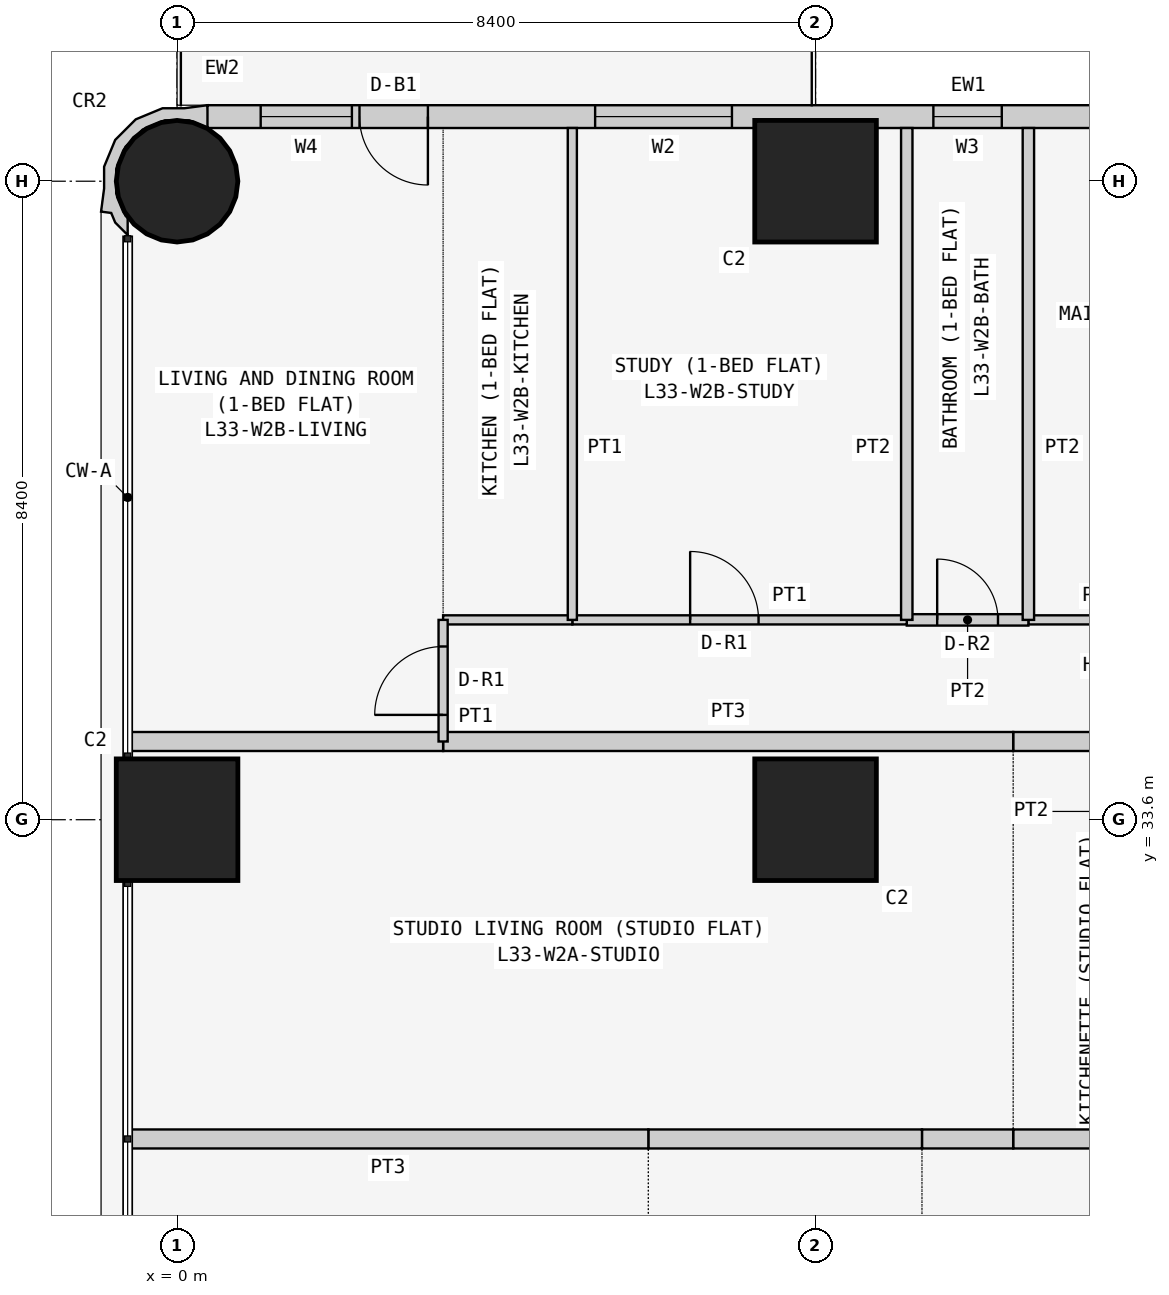
"""IFC4 building model, lengths in metres.
Left out: names, types, materials, properties, quantities, classifications, styles, units other than length and angle.
Written with IfcOpenShell. Run it as: python <this file> out.ifc"""

import sys

from ifc_helpers import new_model, si_unit, direction, frame, frame_2d, origin, origin_2d, place, context, subcontext, project, spatial, polyline, rectangle, circle, outline, extrude, element, fill, save


model = new_model("IFC4")
c1 = context("Model", 3, precision=1e-05, world=origin(), true_north=direction((0.0, 1.0)))
c2 = subcontext(c1, "Body", "Model", "MODEL_VIEW")
j1 = project(units=[si_unit("LENGTHUNIT", "METRE"), si_unit("PLANEANGLEUNIT", "RADIAN")], contexts=[c1])
p1 = place(None, origin())
s1 = spatial("IfcSite", under=j1, at=p1, CompositionType="ELEMENT")
p2 = place(p1, origin())
s2 = spatial("IfcBuilding", under=s1, at=p2, CompositionType="ELEMENT")
p3 = place(p2, frame((0.0, 0.0, 130.5)))
s3 = spatial("IfcBuildingStorey", under=s2, at=p3, CompositionType="ELEMENT", Elevation=130.5)
p4 = place(p3, frame((0.0, 33.6, 0.0), z_axis=(0.0, 0.0, 1.0), x_axis=(1.0, 0.0, 0.0)))
e1 = element("IfcColumn", 1, at=p4, inside=s3, PredefinedType="COLUMN", context=c2, shape_type="SweptSolid", body=[
    extrude(rectangle(XDim=1.6, YDim=1.6, at=origin_2d()), origin(), (0.0, 0.0, 1.0), 3.6),
])
p5 = place(p3, frame((0.0, 42.0, 0.0), z_axis=(0.0, 0.0, 1.0), x_axis=(1.0, 0.0, 0.0)))
e2 = element("IfcColumn", 2, at=p5, inside=s3, PredefinedType="COLUMN", context=c2, shape_type="SweptSolid", body=[
    extrude(circle(Radius=0.8, at=origin_2d()), origin(), (0.0, 0.0, 1.0), 3.6),
])
for number, where, z_axis, x_axis in (
    (3, (8.4, 33.6, 0.0), (0.0, 0.0, 1.0), (1.0, 0.0, 0.0)),
    (4, (8.4, 42.0, 0.0), (0.0, 0.0, 1.0), (1.0, 0.0, 0.0)),
):
    element("IfcColumn", number, at=place(p3, frame(where, z_axis=z_axis, x_axis=x_axis)), inside=s3, PredefinedType="COLUMN", context=c2, shape_type="SweptSolid", body=[
        extrude(rectangle(XDim=1.6, YDim=1.6, at=origin_2d()), origin(), (0.0, 0.0, 1.0), 3.6),
    ])
p6 = place(p3, frame((15.8, 42.85, 0.0), z_axis=(0.0, 0.0, 1.0), x_axis=(-1.0, 0.0, 0.0)))
e5 = element("IfcWall", 5, at=p6, inside=s3, PredefinedType="SOLIDWALL", context=c2, shape_type="SweptSolid", body=[
    extrude(rectangle(XDim=15.4, YDim=0.3, at=frame_2d((7.7, 0.0))), origin(), (0.0, 0.0, 1.0), 3.45),
])
p7 = place(p6, frame((1.2, 0.0, 0.9)))
e6 = element("IfcOpeningElement", 6, at=p7, cuts=e5, PredefinedType="OPENING", context=c2, shape_type="SweptSolid", body=[
    extrude(rectangle(XDim=1.8, YDim=1.5, at=frame_2d((0.9, 0.75))), frame((0.0, 0.16, 0.0), z_axis=(0.0, -1.0, 0.0), x_axis=(1.0, 0.0, 0.0)), (0.0, 0.0, 1.0), 0.32),
])
p8 = place(p6, frame((4.95, 0.0, 1.5)))
e7 = element("IfcOpeningElement", 7, at=p8, cuts=e5, PredefinedType="OPENING", context=c2, shape_type="SweptSolid", body=[
    extrude(rectangle(XDim=0.9, YDim=0.7, at=frame_2d((0.45, 0.35))), frame((0.0, 0.16, 0.0), z_axis=(0.0, -1.0, 0.0), x_axis=(1.0, 0.0, 0.0)), (0.0, 0.0, 1.0), 0.32),
])
p9 = place(p6, frame((8.5, 0.0, 0.9)))
e8 = element("IfcOpeningElement", 8, at=p9, cuts=e5, PredefinedType="OPENING", context=c2, shape_type="SweptSolid", body=[
    extrude(rectangle(XDim=1.8, YDim=1.5, at=frame_2d((0.9, 0.75))), frame((0.0, 0.16, 0.0), z_axis=(0.0, -1.0, 0.0), x_axis=(1.0, 0.0, 0.0)), (0.0, 0.0, 1.0), 0.32),
])
p10 = place(p6, frame((12.5, 0.0, 0.0)))
e9 = element("IfcOpeningElement", 9, at=p10, cuts=e5, PredefinedType="OPENING", context=c2, shape_type="SweptSolid", body=[
    extrude(rectangle(XDim=0.9, YDim=2.4, at=frame_2d((0.45, 1.2))), frame((0.0, 0.16, 0.0), z_axis=(0.0, -1.0, 0.0), x_axis=(1.0, 0.0, 0.0)), (0.0, 0.0, 1.0), 0.32),
])
p11 = place(p6, frame((13.5, 0.0, 0.9)))
e10 = element("IfcOpeningElement", 10, at=p11, cuts=e5, PredefinedType="OPENING", context=c2, shape_type="SweptSolid", body=[
    extrude(rectangle(XDim=1.2, YDim=1.5, at=frame_2d((0.6, 0.75))), frame((0.0, 0.16, 0.0), z_axis=(0.0, -1.0, 0.0), x_axis=(1.0, 0.0, 0.0)), (0.0, 0.0, 1.0), 0.32),
])
p12 = place(p3, frame((0.327, 42.817, 0.0), z_axis=(0.0, 0.0, 1.0), x_axis=(-0.93923434088, 0.343276641956, 0.0)))
e11 = element("IfcWall", 11, at=p12, inside=s3, PredefinedType="SOLIDWALL", context=c2, shape_type="SweptSolid", body=[
    extrude(outline(polyline([(-0.006, -0.197), (0.266, -0.055), (0.535, 0.044), (0.816, 0.302), (0.977, 0.648), (0.994, 1.03), (0.895, 1.299), (0.828, 1.598), (0.697, 1.569), (0.604, 1.67), (0.394, 1.767), (0.471, 1.556), (0.509, 1.539), (0.724, 1.304), (0.833, 1.005), (0.82, 0.687), (0.686, 0.397), (0.451, 0.182), (0.152, 0.073), (-0.116, 0.084), (-0.127, 0.078), (-0.146, 0.071), (-0.006, -0.197)])), origin(), (0.0, 0.0, 1.0), 3.45),
])
for number, where, z_axis, x_axis in (
    (12, (12.2, 29.4, 0.0), (0.0, 0.0, 1.0), (-1.0, 0.0, 0.0)),
    (13, (11.0, 29.4, 0.0), (0.0, 0.0, 1.0), (-1.0, 0.0, 0.0)),
):
    element("IfcWall", number, at=place(p3, frame(where, z_axis=z_axis, x_axis=x_axis)), inside=s3, PredefinedType="PARTITIONING", context=c2, shape_type="SweptSolid", body=[
        extrude(rectangle(XDim=1.2, YDim=0.25, at=frame_2d((0.6, 0.0))), origin(), (0.0, 0.0, 1.0), 3.45),
    ])
p13 = place(p3, frame((9.8, 29.4, 0.0), z_axis=(0.0, 0.0, 1.0), x_axis=(-1.0, 0.0, 0.0)))
e14 = element("IfcWall", 14, at=p13, inside=s3, PredefinedType="PARTITIONING", context=c2, shape_type="SweptSolid", body=[
    extrude(rectangle(XDim=3.6, YDim=0.25, at=frame_2d((1.8, 0.0))), origin(), (0.0, 0.0, 1.0), 3.45),
])
p14 = place(p3, frame((6.2, 29.4, 0.0), z_axis=(0.0, 0.0, 1.0), x_axis=(-1.0, 0.0, 0.0)))
e15 = element("IfcWall", 15, at=p14, inside=s3, PredefinedType="PARTITIONING", context=c2, shape_type="SweptSolid", body=[
    extrude(rectangle(XDim=6.85, YDim=0.25, at=frame_2d((3.425, 0.0))), origin(), (0.0, 0.0, 1.0), 3.45),
])
p15 = place(p3, frame((11.0, 34.629, 0.0), z_axis=(0.0, 0.0, 1.0), x_axis=(1.0, 0.0, 0.0)))
e16 = element("IfcWall", 16, at=p15, inside=s3, PredefinedType="PARTITIONING", context=c2, shape_type="SweptSolid", body=[
    extrude(rectangle(XDim=2.4, YDim=0.25, at=frame_2d((1.2, 0.0))), origin(), (0.0, 0.0, 1.0), 3.45),
])
p16 = place(p3, frame((3.5, 34.629, 0.0), z_axis=(0.0, 0.0, 1.0), x_axis=(1.0, 0.0, 0.0)))
e17 = element("IfcWall", 17, at=p16, inside=s3, PredefinedType="PARTITIONING", context=c2, shape_type="SweptSolid", body=[
    extrude(rectangle(XDim=7.5, YDim=0.25, at=frame_2d((3.75, 0.0))), origin(), (0.0, 0.0, 1.0), 3.45),
])
p17 = place(p3, frame((-0.65, 34.629, 0.0), z_axis=(0.0, 0.0, 1.0), x_axis=(1.0, 0.0, 0.0)))
e18 = element("IfcWall", 18, at=p17, inside=s3, PredefinedType="PARTITIONING", context=c2, shape_type="SweptSolid", body=[
    extrude(rectangle(XDim=4.15, YDim=0.25, at=frame_2d((2.075, 0.0))), origin(), (0.0, 0.0, 1.0), 3.45),
])
p18 = place(p3, frame((11.2, 36.229, 0.0), z_axis=(0.0, 0.0, 1.0), x_axis=(1.0, 0.0, 0.0)))
e19 = element("IfcWall", 19, at=p18, inside=s3, PredefinedType="PARTITIONING", context=c2, shape_type="SweptSolid", body=[
    extrude(rectangle(XDim=4.675, YDim=0.12, at=frame_2d((2.337, 0.0))), origin(), (0.0, 0.0, 1.0), 3.45),
])
p19 = place(p18, frame((1.85, 0.0, 0.0)))
e20 = element("IfcOpeningElement", 20, at=p19, cuts=e19, PredefinedType="OPENING", context=c2, shape_type="SweptSolid", body=[
    extrude(rectangle(XDim=0.9, YDim=2.1, at=frame_2d((0.45, 1.05))), frame((0.0, 0.07, 0.0), z_axis=(0.0, -1.0, 0.0), x_axis=(1.0, 0.0, 0.0)), (0.0, 0.0, 1.0), 0.14),
])
p20 = place(p3, frame((9.6, 36.229, 0.0), z_axis=(0.0, 0.0, 1.0), x_axis=(1.0, 0.0, 0.0)))
e21 = element("IfcWall", 21, at=p20, inside=s3, PredefinedType="PARTITIONING", context=c2, shape_type="SweptSolid", body=[
    extrude(rectangle(XDim=1.6, YDim=0.15, at=frame_2d((0.8, 0.0))), origin(), (0.0, 0.0, 1.0), 3.45),
])
p21 = place(p20, frame((0.4, 0.0, 0.0)))
e22 = element("IfcOpeningElement", 22, at=p21, cuts=e21, PredefinedType="OPENING", context=c2, shape_type="SweptSolid", body=[
    extrude(rectangle(XDim=0.8, YDim=2.1, at=frame_2d((0.4, 1.05))), frame((0.0, 0.085, 0.0), z_axis=(0.0, -1.0, 0.0), x_axis=(1.0, 0.0, 0.0)), (0.0, 0.0, 1.0), 0.17),
])
p22 = place(p3, frame((5.2, 36.229, 0.0), z_axis=(0.0, 0.0, 1.0), x_axis=(1.0, 0.0, 0.0)))
e23 = element("IfcWall", 23, at=p22, inside=s3, PredefinedType="PARTITIONING", context=c2, shape_type="SweptSolid", body=[
    extrude(rectangle(XDim=4.4, YDim=0.12, at=frame_2d((2.2, 0.0))), origin(), (0.0, 0.0, 1.0), 3.45),
])
p23 = place(p22, frame((1.55, 0.0, 0.0)))
e24 = element("IfcOpeningElement", 24, at=p23, cuts=e23, PredefinedType="OPENING", context=c2, shape_type="SweptSolid", body=[
    extrude(rectangle(XDim=0.9, YDim=2.1, at=frame_2d((0.45, 1.05))), frame((0.0, 0.07, 0.0), z_axis=(0.0, -1.0, 0.0), x_axis=(1.0, 0.0, 0.0)), (0.0, 0.0, 1.0), 0.14),
])
p24 = place(p3, frame((3.5, 36.229, 0.0), z_axis=(0.0, 0.0, 1.0), x_axis=(1.0, 0.0, 0.0)))
e25 = element("IfcWall", 25, at=p24, inside=s3, PredefinedType="PARTITIONING", context=c2, shape_type="SweptSolid", body=[
    extrude(rectangle(XDim=1.7, YDim=0.12, at=frame_2d((0.85, 0.0))), origin(), (0.0, 0.0, 1.0), 3.45),
])
p25 = place(p3, frame((3.5, 34.629, 0.0), z_axis=(0.0, 0.0, 1.0), x_axis=(0.0, 1.0, 0.0)))
e26 = element("IfcWall", 26, at=p25, inside=s3, PredefinedType="PARTITIONING", context=c2, shape_type="SweptSolid", body=[
    extrude(rectangle(XDim=1.6, YDim=0.12, at=frame_2d((0.8, 0.0))), origin(), (0.0, 0.0, 1.0), 3.45),
])
p26 = place(p25, frame((0.35, 0.0, 0.0)))
e27 = element("IfcOpeningElement", 27, at=p26, cuts=e26, PredefinedType="OPENING", context=c2, shape_type="SweptSolid", body=[
    extrude(rectangle(XDim=0.9, YDim=2.1, at=frame_2d((0.45, 1.05))), frame((0.0, 0.07, 0.0), z_axis=(0.0, -1.0, 0.0), x_axis=(1.0, 0.0, 0.0)), (0.0, 0.0, 1.0), 0.14),
])
for number, where, z_axis, x_axis in (
    (28, (11.2, 36.229, 0.0), (0.0, 0.0, 1.0), (0.0, 1.0, 0.0)),
    (29, (9.6, 36.229, 0.0), (0.0, 0.0, 1.0), (0.0, 1.0, 0.0)),
):
    element("IfcWall", number, at=place(p3, frame(where, z_axis=z_axis, x_axis=x_axis)), inside=s3, PredefinedType="PARTITIONING", context=c2, shape_type="SweptSolid", body=[
        extrude(rectangle(XDim=6.471, YDim=0.15, at=frame_2d((3.235, 0.0))), origin(), (0.0, 0.0, 1.0), 3.45),
    ])
p27 = place(p3, frame((5.2, 36.229, 0.0), z_axis=(0.0, 0.0, 1.0), x_axis=(0.0, 1.0, 0.0)))
e30 = element("IfcWall", 30, at=p27, inside=s3, PredefinedType="PARTITIONING", context=c2, shape_type="SweptSolid", body=[
    extrude(rectangle(XDim=6.471, YDim=0.12, at=frame_2d((3.235, 0.0))), origin(), (0.0, 0.0, 1.0), 3.45),
])
p28 = place(p8, origin())
e31 = element("IfcWindow", 31, at=p28, inside=s3, PartitioningType="SINGLE_PANEL", PredefinedType="WINDOW", context=c2, shape_type="SweptSolid", body=[
    extrude(rectangle(XDim=0.9, YDim=0.7, at=frame_2d((0.45, 0.35))), frame((0.0, 0.03, 0.0), z_axis=(0.0, -1.0, 0.0), x_axis=(1.0, 0.0, 0.0)), (0.0, 0.0, 1.0), 0.06),
])
fill(e7, e31)
p29 = place(p9, origin())
e32 = element("IfcWindow", 32, at=p29, inside=s3, PartitioningType="SINGLE_PANEL", PredefinedType="WINDOW", context=c2, shape_type="SweptSolid", body=[
    extrude(rectangle(XDim=1.8, YDim=1.5, at=frame_2d((0.9, 0.75))), frame((0.0, 0.03, 0.0), z_axis=(0.0, -1.0, 0.0), x_axis=(1.0, 0.0, 0.0)), (0.0, 0.0, 1.0), 0.06),
])
fill(e8, e32)
p30 = place(p10, origin())
e33 = element("IfcDoor", 33, at=p30, inside=s3, OperationType="SINGLE_SWING_LEFT", PredefinedType="DOOR", context=c2, shape_type="SweptSolid", body=[
    extrude(rectangle(XDim=0.9, YDim=2.4, at=frame_2d((0.45, 1.2))), frame((0.0, 0.025, 0.0), z_axis=(0.0, -1.0, 0.0), x_axis=(1.0, 0.0, 0.0)), (0.0, 0.0, 1.0), 0.05),
])
fill(e9, e33)
p31 = place(p11, origin())
e34 = element("IfcWindow", 34, at=p31, inside=s3, PartitioningType="SINGLE_PANEL", PredefinedType="WINDOW", context=c2, shape_type="SweptSolid", body=[
    extrude(rectangle(XDim=1.2, YDim=1.5, at=frame_2d((0.6, 0.75))), frame((0.0, 0.03, 0.0), z_axis=(0.0, -1.0, 0.0), x_axis=(1.0, 0.0, 0.0)), (0.0, 0.0, 1.0), 0.06),
])
fill(e10, e34)
p32 = place(p21, origin())
e35 = element("IfcDoor", 35, at=p32, inside=s3, OperationType="SINGLE_SWING_LEFT", PredefinedType="DOOR", context=c2, shape_type="SweptSolid", body=[
    extrude(rectangle(XDim=0.8, YDim=2.1, at=frame_2d((0.4, 1.05))), frame((0.0, 0.025, 0.0), z_axis=(0.0, -1.0, 0.0), x_axis=(1.0, 0.0, 0.0)), (0.0, 0.0, 1.0), 0.05),
])
fill(e22, e35)
p33 = place(p23, origin())
e36 = element("IfcDoor", 36, at=p33, inside=s3, OperationType="SINGLE_SWING_LEFT", PredefinedType="DOOR", context=c2, shape_type="SweptSolid", body=[
    extrude(rectangle(XDim=0.9, YDim=2.1, at=frame_2d((0.45, 1.05))), frame((0.0, 0.025, 0.0), z_axis=(0.0, -1.0, 0.0), x_axis=(1.0, 0.0, 0.0)), (0.0, 0.0, 1.0), 0.05),
])
fill(e24, e36)
p34 = place(p26, origin())
e37 = element("IfcDoor", 37, at=p34, inside=s3, OperationType="SINGLE_SWING_LEFT", PredefinedType="DOOR", context=c2, shape_type="SweptSolid", body=[
    extrude(rectangle(XDim=0.9, YDim=2.1, at=frame_2d((0.45, 1.05))), frame((0.0, 0.025, 0.0), z_axis=(0.0, -1.0, 0.0), x_axis=(1.0, 0.0, 0.0)), (0.0, 0.0, 1.0), 0.05),
])
fill(e27, e37)
save(model, sys.argv[1])
